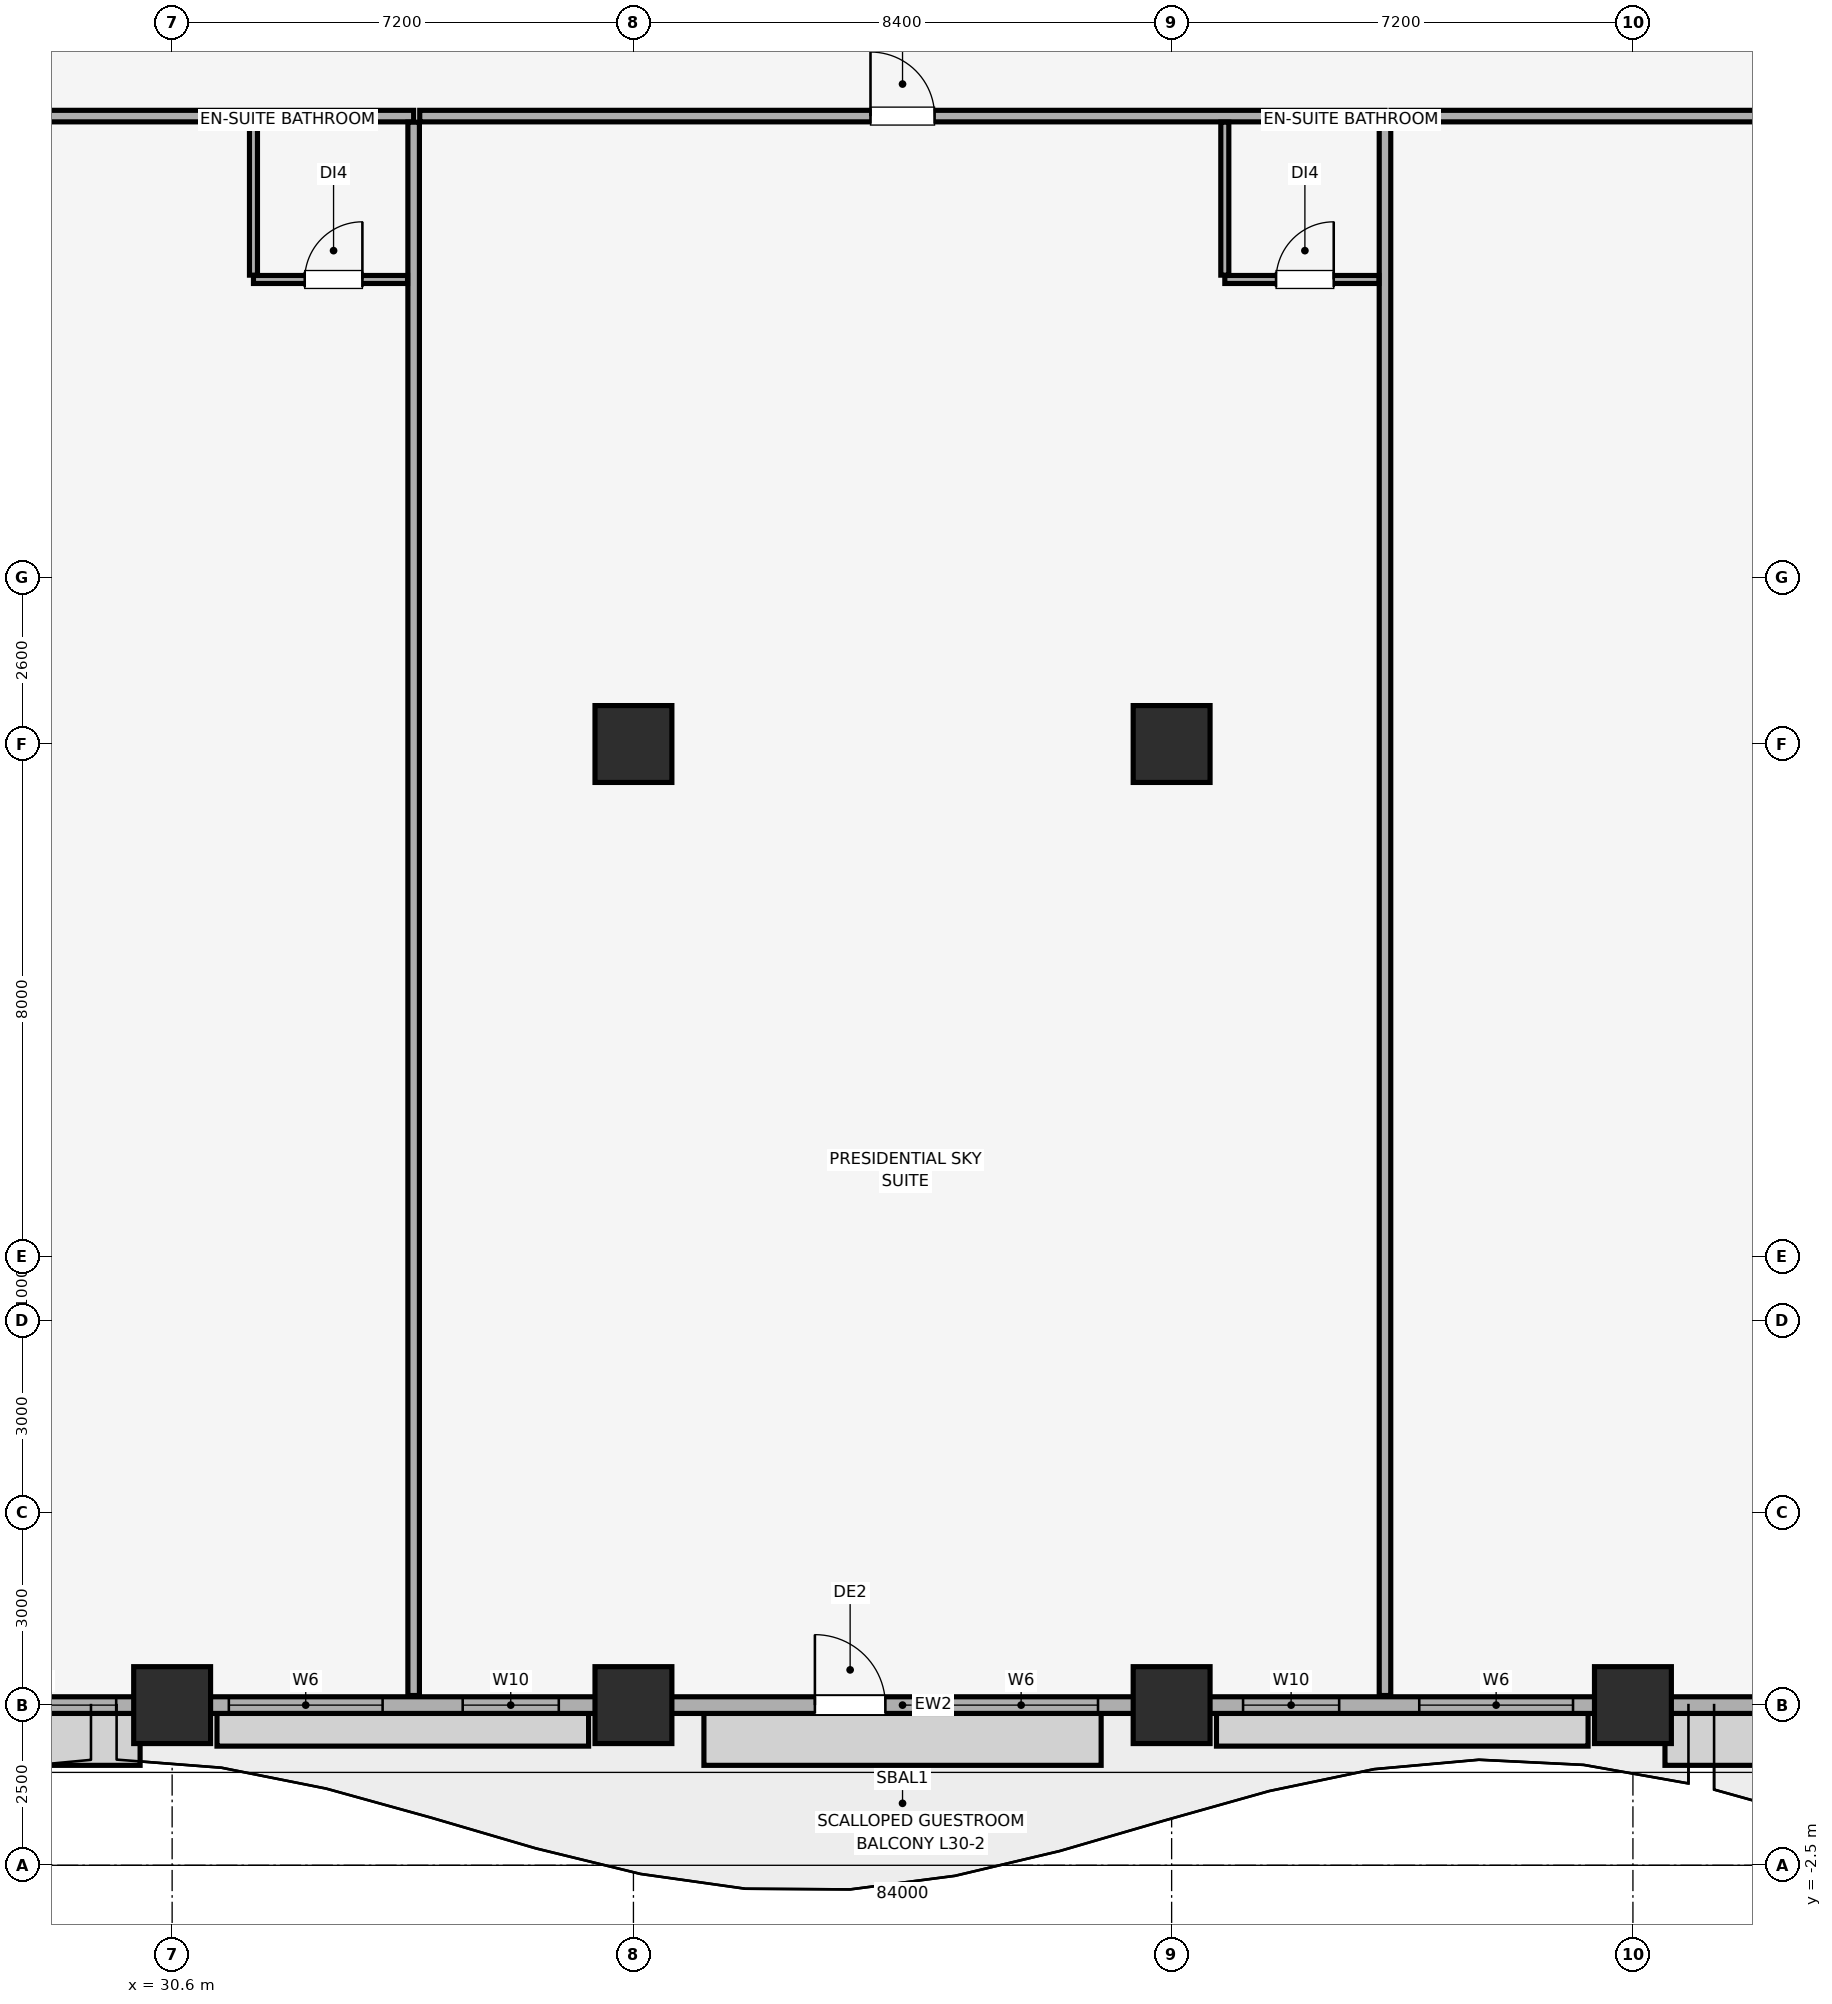
"""IFC4 building model, lengths in metres.
Left out: names, types, materials, properties, quantities, classifications, styles, units other than length and angle.
Written with IfcOpenShell. Run it as: python <this file> out.ifc"""

import sys

from ifc_helpers import new_model, si_unit, direction, frame, frame_2d, origin, origin_2d, place, context, subcontext, project, spatial, rectangle, extrude, element, fill, save


model = new_model("IFC4")
c1 = context("Model", 3, precision=1e-05, world=origin(), true_north=direction((0.0, 1.0)))
c2 = subcontext(c1, "Body", "Model", "MODEL_VIEW")
j1 = project(units=[si_unit("LENGTHUNIT", "METRE"), si_unit("PLANEANGLEUNIT", "RADIAN")], contexts=[c1])
p1 = place(None, origin())
s1 = spatial("IfcSite", under=j1, at=p1, CompositionType="ELEMENT")
p2 = place(p1, origin())
s2 = spatial("IfcBuilding", under=s1, at=p2, CompositionType="ELEMENT")
p3 = place(p2, frame((0.0, 0.0, 126.8)))
s3 = spatial("IfcBuildingStorey", under=s2, at=p3, CompositionType="ELEMENT", Elevation=126.8)
for number, where, z_axis, x_axis in (
    (1, (30.6, 0.0, 0.0), (0.0, 0.0, 1.0), (1.0, 0.0, 0.0)),
    (2, (37.8, 0.0, 0.0), (0.0, 0.0, 1.0), (1.0, 0.0, 0.0)),
    (3, (46.2, 0.0, 0.0), (0.0, 0.0, 1.0), (1.0, 0.0, 0.0)),
    (4, (53.4, 0.0, 0.0), (0.0, 0.0, 1.0), (1.0, 0.0, 0.0)),
    (5, (37.8, 15.0, 0.0), (0.0, 0.0, 1.0), (1.0, 0.0, 0.0)),
    (6, (46.2, 15.0, 0.0), (0.0, 0.0, 1.0), (1.0, 0.0, 0.0)),
):
    element("IfcColumn", number, at=place(p3, frame(where, z_axis=z_axis, x_axis=x_axis)), inside=s3, PredefinedType="COLUMN", context=c2, shape_type="SweptSolid", body=[
        extrude(rectangle(XDim=1.2, YDim=1.2, at=origin_2d()), origin(), (0.0, 0.0, 1.0), 3.51),
    ])
p4 = place(p3, frame((4.2, 0.0, 0.0), z_axis=(0.0, 0.0, 1.0), x_axis=(1.0, 0.0, 0.0)))
e7 = element("IfcWall", 7, at=p4, inside=s3, PredefinedType="SOLIDWALL", context=c2, shape_type="SweptSolid", body=[
    extrude(rectangle(XDim=75.6, YDim=0.26, at=frame_2d((37.8, 0.0))), origin(), (0.0, 0.0, 1.0), 2.56),
])
p5 = place(p4, frame((21.383, 0.0, 0.0)))
e8 = element("IfcOpeningElement", 8, at=p5, cuts=e7, PredefinedType="OPENING", context=c2, shape_type="SweptSolid", body=[
    extrude(rectangle(XDim=1.1, YDim=2.15, at=frame_2d((0.55, 1.075))), frame((0.0, 0.14, 0.0), z_axis=(0.0, -1.0, 0.0), x_axis=(1.0, 0.0, 0.0)), (0.0, 0.0, 1.0), 0.28),
])
p6 = place(p4, frame((36.432, 0.0, 0.0)))
e9 = element("IfcOpeningElement", 9, at=p6, cuts=e7, PredefinedType="OPENING", context=c2, shape_type="SweptSolid", body=[
    extrude(rectangle(XDim=1.1, YDim=2.15, at=frame_2d((0.55, 1.075))), frame((0.0, 0.14, 0.0), z_axis=(0.0, -1.0, 0.0), x_axis=(1.0, 0.0, 0.0)), (0.0, 0.0, 1.0), 0.28),
])
p7 = place(p4, frame((58.094, 0.0, 0.0)))
e10 = element("IfcOpeningElement", 10, at=p7, cuts=e7, PredefinedType="OPENING", context=c2, shape_type="SweptSolid", body=[
    extrude(rectangle(XDim=1.1, YDim=2.15, at=frame_2d((0.55, 1.075))), frame((0.0, 0.14, 0.0), z_axis=(0.0, -1.0, 0.0), x_axis=(1.0, 0.0, 0.0)), (0.0, 0.0, 1.0), 0.28),
])
p8 = place(p4, frame((1.035, 0.0, 0.85)))
e11 = element("IfcOpeningElement", 11, at=p8, cuts=e7, PredefinedType="OPENING", context=c2, shape_type="SweptSolid", body=[
    extrude(rectangle(XDim=2.4, YDim=1.5, at=frame_2d((1.2, 0.75))), frame((0.0, 0.14, 0.0), z_axis=(0.0, -1.0, 0.0), x_axis=(1.0, 0.0, 0.0)), (0.0, 0.0, 1.0), 0.28),
])
p9 = place(p4, frame((7.2, 0.0, 0.85)))
e12 = element("IfcOpeningElement", 12, at=p9, cuts=e7, PredefinedType="OPENING", context=c2, shape_type="SweptSolid", body=[
    extrude(rectangle(XDim=2.4, YDim=1.5, at=frame_2d((1.2, 0.75))), frame((0.0, 0.14, 0.0), z_axis=(0.0, -1.0, 0.0), x_axis=(1.0, 0.0, 0.0)), (0.0, 0.0, 1.0), 0.28),
])
p10 = place(p4, frame((13.055, 0.0, 0.85)))
e13 = element("IfcOpeningElement", 13, at=p10, cuts=e7, PredefinedType="OPENING", context=c2, shape_type="SweptSolid", body=[
    extrude(rectangle(XDim=1.5, YDim=1.4, at=frame_2d((0.75, 0.7))), frame((0.0, 0.14, 0.0), z_axis=(0.0, -1.0, 0.0), x_axis=(1.0, 0.0, 0.0)), (0.0, 0.0, 1.0), 0.28),
])
p11 = place(p4, frame((15.805, 0.0, 0.85)))
e14 = element("IfcOpeningElement", 14, at=p11, cuts=e7, PredefinedType="OPENING", context=c2, shape_type="SweptSolid", body=[
    extrude(rectangle(XDim=2.4, YDim=1.5, at=frame_2d((1.2, 0.75))), frame((0.0, 0.14, 0.0), z_axis=(0.0, -1.0, 0.0), x_axis=(1.0, 0.0, 0.0)), (0.0, 0.0, 1.0), 0.28),
])
p12 = place(p4, frame((23.127, 0.0, 0.85)))
e15 = element("IfcOpeningElement", 15, at=p12, cuts=e7, PredefinedType="OPENING", context=c2, shape_type="SweptSolid", body=[
    extrude(rectangle(XDim=2.4, YDim=1.5, at=frame_2d((1.2, 0.75))), frame((0.0, 0.14, 0.0), z_axis=(0.0, -1.0, 0.0), x_axis=(1.0, 0.0, 0.0)), (0.0, 0.0, 1.0), 0.28),
])
p13 = place(p4, frame((27.285, 0.0, 0.85)))
e16 = element("IfcOpeningElement", 16, at=p13, cuts=e7, PredefinedType="OPENING", context=c2, shape_type="SweptSolid", body=[
    extrude(rectangle(XDim=2.4, YDim=1.5, at=frame_2d((1.2, 0.75))), frame((0.0, 0.14, 0.0), z_axis=(0.0, -1.0, 0.0), x_axis=(1.0, 0.0, 0.0)), (0.0, 0.0, 1.0), 0.28),
])
p14 = place(p4, frame((30.935, 0.0, 0.85)))
e17 = element("IfcOpeningElement", 17, at=p14, cuts=e7, PredefinedType="OPENING", context=c2, shape_type="SweptSolid", body=[
    extrude(rectangle(XDim=1.5, YDim=1.4, at=frame_2d((0.75, 0.7))), frame((0.0, 0.14, 0.0), z_axis=(0.0, -1.0, 0.0), x_axis=(1.0, 0.0, 0.0)), (0.0, 0.0, 1.0), 0.28),
])
p15 = place(p4, frame((38.451, 0.0, 0.85)))
e18 = element("IfcOpeningElement", 18, at=p15, cuts=e7, PredefinedType="OPENING", context=c2, shape_type="SweptSolid", body=[
    extrude(rectangle(XDim=2.4, YDim=1.5, at=frame_2d((1.2, 0.75))), frame((0.0, 0.14, 0.0), z_axis=(0.0, -1.0, 0.0), x_axis=(1.0, 0.0, 0.0)), (0.0, 0.0, 1.0), 0.28),
])
p16 = place(p4, frame((43.115, 0.0, 0.85)))
e19 = element("IfcOpeningElement", 19, at=p16, cuts=e7, PredefinedType="OPENING", context=c2, shape_type="SweptSolid", body=[
    extrude(rectangle(XDim=1.5, YDim=1.4, at=frame_2d((0.75, 0.7))), frame((0.0, 0.14, 0.0), z_axis=(0.0, -1.0, 0.0), x_axis=(1.0, 0.0, 0.0)), (0.0, 0.0, 1.0), 0.28),
])
p17 = place(p4, frame((45.865, 0.0, 0.85)))
e20 = element("IfcOpeningElement", 20, at=p17, cuts=e7, PredefinedType="OPENING", context=c2, shape_type="SweptSolid", body=[
    extrude(rectangle(XDim=2.4, YDim=1.5, at=frame_2d((1.2, 0.75))), frame((0.0, 0.14, 0.0), z_axis=(0.0, -1.0, 0.0), x_axis=(1.0, 0.0, 0.0)), (0.0, 0.0, 1.0), 0.28),
])
p18 = place(p4, frame((51.6, 0.0, 0.85)))
e21 = element("IfcOpeningElement", 21, at=p18, cuts=e7, PredefinedType="OPENING", context=c2, shape_type="SweptSolid", body=[
    extrude(rectangle(XDim=2.4, YDim=1.5, at=frame_2d((1.2, 0.75))), frame((0.0, 0.14, 0.0), z_axis=(0.0, -1.0, 0.0), x_axis=(1.0, 0.0, 0.0)), (0.0, 0.0, 1.0), 0.28),
])
p19 = place(p4, frame((61.095, 0.0, 0.85)))
e22 = element("IfcOpeningElement", 22, at=p19, cuts=e7, PredefinedType="OPENING", context=c2, shape_type="SweptSolid", body=[
    extrude(rectangle(XDim=1.5, YDim=1.4, at=frame_2d((0.75, 0.7))), frame((0.0, 0.14, 0.0), z_axis=(0.0, -1.0, 0.0), x_axis=(1.0, 0.0, 0.0)), (0.0, 0.0, 1.0), 0.28),
])
p20 = place(p4, frame((66.0, 0.0, 0.85)))
e23 = element("IfcOpeningElement", 23, at=p20, cuts=e7, PredefinedType="OPENING", context=c2, shape_type="SweptSolid", body=[
    extrude(rectangle(XDim=2.4, YDim=1.5, at=frame_2d((1.2, 0.75))), frame((0.0, 0.14, 0.0), z_axis=(0.0, -1.0, 0.0), x_axis=(1.0, 0.0, 0.0)), (0.0, 0.0, 1.0), 0.28),
])
p21 = place(p4, frame((72.165, 0.0, 0.85)))
e24 = element("IfcOpeningElement", 24, at=p21, cuts=e7, PredefinedType="OPENING", context=c2, shape_type="SweptSolid", body=[
    extrude(rectangle(XDim=2.4, YDim=1.5, at=frame_2d((1.2, 0.75))), frame((0.0, 0.14, 0.0), z_axis=(0.0, -1.0, 0.0), x_axis=(1.0, 0.0, 0.0)), (0.0, 0.0, 1.0), 0.28),
])
p22 = place(p3, frame((19.505, 24.8, 0.0), z_axis=(0.0, 0.0, 1.0), x_axis=(1.0, 0.0, 0.0)))
e25 = element("IfcWall", 25, at=p22, inside=s3, PredefinedType="PARTITIONING", context=c2, shape_type="SweptSolid", body=[
    extrude(rectangle(XDim=14.865, YDim=0.18, at=frame_2d((7.432, 0.0))), origin(), (0.0, 0.0, 1.0), 3.51),
])
p23 = place(p22, frame((6.995, 0.0, 0.0)))
e26 = element("IfcOpeningElement", 26, at=p23, cuts=e25, PredefinedType="OPENING", context=c2, shape_type="SweptSolid", body=[
    extrude(rectangle(XDim=1.0, YDim=2.15, at=frame_2d((0.5, 1.075))), frame((0.0, 0.1, 0.0), z_axis=(0.0, -1.0, 0.0), x_axis=(1.0, 0.0, 0.0)), (0.0, 0.0, 1.0), 0.2),
])
p24 = place(p3, frame((34.369, 0.15, 0.0), z_axis=(0.0, 0.0, 1.0), x_axis=(0.0, 1.0, 0.0)))
e27 = element("IfcWall", 27, at=p24, inside=s3, PredefinedType="PARTITIONING", context=c2, shape_type="SweptSolid", body=[
    extrude(rectangle(XDim=24.555, YDim=0.18, at=frame_2d((12.278, 0.0))), origin(), (0.0, 0.0, 1.0), 2.91),
])
p25 = place(p3, frame((31.869, 22.25, 0.0), z_axis=(0.0, 0.0, 1.0), x_axis=(1.0, 0.0, 0.0)))
e28 = element("IfcWall", 28, at=p25, inside=s3, PredefinedType="PARTITIONING", context=c2, shape_type="SweptSolid", body=[
    extrude(rectangle(XDim=2.405, YDim=0.125, at=frame_2d((1.203, 0.0))), origin(), (0.0, 0.0, 1.0), 3.51),
])
p26 = place(p25, frame((0.8, 0.0, 0.0)))
e29 = element("IfcOpeningElement", 29, at=p26, cuts=e28, PredefinedType="OPENING", context=c2, shape_type="SweptSolid", body=[
    extrude(rectangle(XDim=0.9, YDim=2.1, at=frame_2d((0.45, 1.05))), frame((0.0, 0.073, 0.0), z_axis=(0.0, -1.0, 0.0), x_axis=(1.0, 0.0, 0.0)), (0.0, 0.0, 1.0), 0.145),
])
p27 = place(p3, frame((31.869, 22.317, 0.0), z_axis=(0.0, 0.0, 1.0), x_axis=(0.0, 1.0, 0.0)))
e30 = element("IfcWall", 30, at=p27, inside=s3, PredefinedType="PARTITIONING", context=c2, shape_type="SweptSolid", body=[
    extrude(rectangle(XDim=2.388, YDim=0.125, at=frame_2d((1.194, 0.0))), origin(), (0.0, 0.0, 1.0), 3.51),
])
p28 = place(p3, frame((34.465, 24.8, 0.0), z_axis=(0.0, 0.0, 1.0), x_axis=(1.0, 0.0, 0.0)))
e31 = element("IfcWall", 31, at=p28, inside=s3, PredefinedType="PARTITIONING", context=c2, shape_type="SweptSolid", body=[
    extrude(rectangle(XDim=15.065, YDim=0.18, at=frame_2d((7.533, 0.0))), origin(), (0.0, 0.0, 1.0), 3.51),
])
p29 = place(p28, frame((7.035, 0.0, 0.0)))
e32 = element("IfcOpeningElement", 32, at=p29, cuts=e31, PredefinedType="OPENING", context=c2, shape_type="SweptSolid", body=[
    extrude(rectangle(XDim=1.0, YDim=2.15, at=frame_2d((0.5, 1.075))), frame((0.0, 0.1, 0.0), z_axis=(0.0, -1.0, 0.0), x_axis=(1.0, 0.0, 0.0)), (0.0, 0.0, 1.0), 0.2),
])
p30 = place(p3, frame((49.53, 0.15, 0.0), z_axis=(0.0, 0.0, 1.0), x_axis=(0.0, 1.0, 0.0)))
e33 = element("IfcWall", 33, at=p30, inside=s3, PredefinedType="PARTITIONING", context=c2, shape_type="SweptSolid", body=[
    extrude(rectangle(XDim=24.555, YDim=0.18, at=frame_2d((12.278, 0.0))), origin(), (0.0, 0.0, 1.0), 2.91),
])
p31 = place(p3, frame((47.03, 22.25, 0.0), z_axis=(0.0, 0.0, 1.0), x_axis=(1.0, 0.0, 0.0)))
e34 = element("IfcWall", 34, at=p31, inside=s3, PredefinedType="PARTITIONING", context=c2, shape_type="SweptSolid", body=[
    extrude(rectangle(XDim=2.405, YDim=0.125, at=frame_2d((1.203, 0.0))), origin(), (0.0, 0.0, 1.0), 3.51),
])
p32 = place(p31, frame((0.8, 0.0, 0.0)))
e35 = element("IfcOpeningElement", 35, at=p32, cuts=e34, PredefinedType="OPENING", context=c2, shape_type="SweptSolid", body=[
    extrude(rectangle(XDim=0.9, YDim=2.1, at=frame_2d((0.45, 1.05))), frame((0.0, 0.073, 0.0), z_axis=(0.0, -1.0, 0.0), x_axis=(1.0, 0.0, 0.0)), (0.0, 0.0, 1.0), 0.145),
])
p33 = place(p3, frame((47.03, 22.317, 0.0), z_axis=(0.0, 0.0, 1.0), x_axis=(0.0, 1.0, 0.0)))
e36 = element("IfcWall", 36, at=p33, inside=s3, PredefinedType="PARTITIONING", context=c2, shape_type="SweptSolid", body=[
    extrude(rectangle(XDim=2.388, YDim=0.125, at=frame_2d((1.194, 0.0))), origin(), (0.0, 0.0, 1.0), 3.51),
])
p34 = place(p3, frame((49.625, 24.8, 0.0), z_axis=(0.0, 0.0, 1.0), x_axis=(1.0, 0.0, 0.0)))
e37 = element("IfcWall", 37, at=p34, inside=s3, PredefinedType="PARTITIONING", context=c2, shape_type="SweptSolid", body=[
    extrude(rectangle(XDim=15.066, YDim=0.18, at=frame_2d((7.533, 0.0))), origin(), (0.0, 0.0, 1.0), 3.51),
])
p35 = place(p34, frame((6.875, 0.0, 0.0)))
e38 = element("IfcOpeningElement", 38, at=p35, cuts=e37, PredefinedType="OPENING", context=c2, shape_type="SweptSolid", body=[
    extrude(rectangle(XDim=1.0, YDim=2.15, at=frame_2d((0.5, 1.075))), frame((0.0, 0.1, 0.0), z_axis=(0.0, -1.0, 0.0), x_axis=(1.0, 0.0, 0.0)), (0.0, 0.0, 1.0), 0.2),
])
p36 = place(p6, origin())
e39 = element("IfcDoor", 39, at=p36, inside=s3, OperationType="SINGLE_SWING_LEFT", PredefinedType="DOOR", context=c2, shape_type="SweptSolid", body=[
    extrude(rectangle(XDim=1.1, YDim=2.15, at=frame_2d((0.55, 1.075))), frame((0.0, 0.025, 0.0), z_axis=(0.0, -1.0, 0.0), x_axis=(1.0, 0.0, 0.0)), (0.0, 0.0, 1.0), 0.05),
])
fill(e9, e39)
p37 = place(p12, origin())
e40 = element("IfcWindow", 40, at=p37, inside=s3, PartitioningType="SINGLE_PANEL", PredefinedType="WINDOW", context=c2, shape_type="SweptSolid", body=[
    extrude(rectangle(XDim=2.4, YDim=1.5, at=frame_2d((1.2, 0.75))), frame((0.0, 0.03, 0.0), z_axis=(0.0, -1.0, 0.0), x_axis=(1.0, 0.0, 0.0)), (0.0, 0.0, 1.0), 0.06),
])
fill(e15, e40)
p38 = place(p13, origin())
e41 = element("IfcWindow", 41, at=p38, inside=s3, PartitioningType="SINGLE_PANEL", PredefinedType="WINDOW", context=c2, shape_type="SweptSolid", body=[
    extrude(rectangle(XDim=2.4, YDim=1.5, at=frame_2d((1.2, 0.75))), frame((0.0, 0.03, 0.0), z_axis=(0.0, -1.0, 0.0), x_axis=(1.0, 0.0, 0.0)), (0.0, 0.0, 1.0), 0.06),
])
fill(e16, e41)
p39 = place(p14, origin())
e42 = element("IfcWindow", 42, at=p39, inside=s3, PartitioningType="SINGLE_PANEL", PredefinedType="WINDOW", context=c2, shape_type="SweptSolid", body=[
    extrude(rectangle(XDim=1.5, YDim=1.4, at=frame_2d((0.75, 0.7))), frame((0.0, 0.03, 0.0), z_axis=(0.0, -1.0, 0.0), x_axis=(1.0, 0.0, 0.0)), (0.0, 0.0, 1.0), 0.06),
])
fill(e17, e42)
p40 = place(p15, origin())
e43 = element("IfcWindow", 43, at=p40, inside=s3, PartitioningType="SINGLE_PANEL", PredefinedType="WINDOW", context=c2, shape_type="SweptSolid", body=[
    extrude(rectangle(XDim=2.4, YDim=1.5, at=frame_2d((1.2, 0.75))), frame((0.0, 0.03, 0.0), z_axis=(0.0, -1.0, 0.0), x_axis=(1.0, 0.0, 0.0)), (0.0, 0.0, 1.0), 0.06),
])
fill(e18, e43)
p41 = place(p16, origin())
e44 = element("IfcWindow", 44, at=p41, inside=s3, PartitioningType="SINGLE_PANEL", PredefinedType="WINDOW", context=c2, shape_type="SweptSolid", body=[
    extrude(rectangle(XDim=1.5, YDim=1.4, at=frame_2d((0.75, 0.7))), frame((0.0, 0.03, 0.0), z_axis=(0.0, -1.0, 0.0), x_axis=(1.0, 0.0, 0.0)), (0.0, 0.0, 1.0), 0.06),
])
fill(e19, e44)
p42 = place(p17, origin())
e45 = element("IfcWindow", 45, at=p42, inside=s3, PartitioningType="SINGLE_PANEL", PredefinedType="WINDOW", context=c2, shape_type="SweptSolid", body=[
    extrude(rectangle(XDim=2.4, YDim=1.5, at=frame_2d((1.2, 0.75))), frame((0.0, 0.03, 0.0), z_axis=(0.0, -1.0, 0.0), x_axis=(1.0, 0.0, 0.0)), (0.0, 0.0, 1.0), 0.06),
])
fill(e20, e45)
p43 = place(p26, origin())
e46 = element("IfcDoor", 46, at=p43, inside=s3, OperationType="SINGLE_SWING_RIGHT", PredefinedType="DOOR", context=c2, shape_type="SweptSolid", body=[
    extrude(rectangle(XDim=0.9, YDim=2.1, at=frame_2d((0.45, 1.05))), frame((0.0, 0.025, 0.0), z_axis=(0.0, -1.0, 0.0), x_axis=(1.0, 0.0, 0.0)), (0.0, 0.0, 1.0), 0.05),
])
fill(e29, e46)
p44 = place(p29, origin())
e47 = element("IfcDoor", 47, at=p44, inside=s3, OperationType="SINGLE_SWING_LEFT", PredefinedType="DOOR", context=c2, shape_type="SweptSolid", body=[
    extrude(rectangle(XDim=1.0, YDim=2.15, at=frame_2d((0.5, 1.075))), frame((0.0, 0.025, 0.0), z_axis=(0.0, -1.0, 0.0), x_axis=(1.0, 0.0, 0.0)), (0.0, 0.0, 1.0), 0.05),
])
fill(e32, e47)
p45 = place(p32, origin())
e48 = element("IfcDoor", 48, at=p45, inside=s3, OperationType="SINGLE_SWING_RIGHT", PredefinedType="DOOR", context=c2, shape_type="SweptSolid", body=[
    extrude(rectangle(XDim=0.9, YDim=2.1, at=frame_2d((0.45, 1.05))), frame((0.0, 0.025, 0.0), z_axis=(0.0, -1.0, 0.0), x_axis=(1.0, 0.0, 0.0)), (0.0, 0.0, 1.0), 0.05),
])
fill(e35, e48)
save(model, sys.argv[1])
